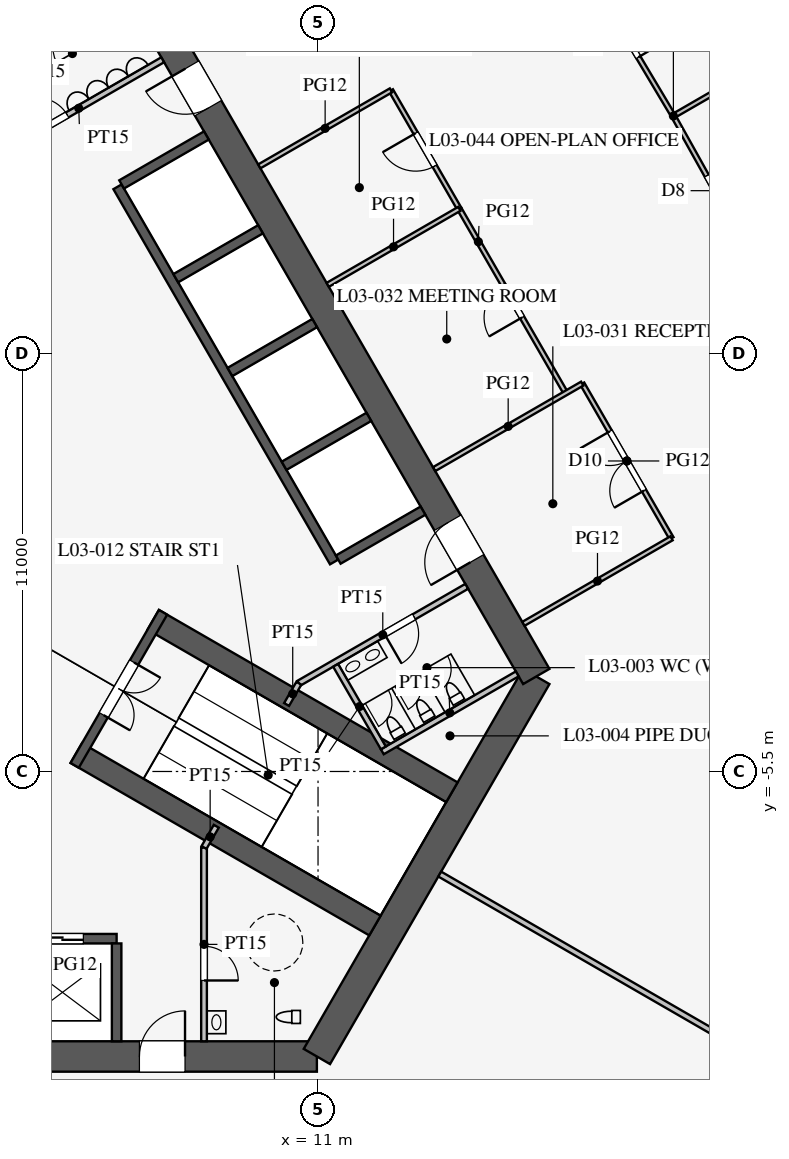
"""IFC4 building model, lengths in metres.
Left out: names, types, materials, properties, quantities, classifications, styles, units other than length and angle.
Written with IfcOpenShell. Run it as: python <this file> out.ifc"""

import sys

from ifc_helpers import new_model, si_unit, direction, frame, frame_2d, origin, place, context, subcontext, project, spatial, rectangle, extrude, element, fill, save


model = new_model("IFC4")
c1 = context("Model", 3, precision=1e-05, world=origin(), true_north=direction((0.0, 1.0)))
c2 = subcontext(c1, "Body", "Model", "MODEL_VIEW")
j1 = project(units=[si_unit("LENGTHUNIT", "METRE"), si_unit("PLANEANGLEUNIT", "RADIAN")], contexts=[c1])
p1 = place(None, origin())
s1 = spatial("IfcSite", under=j1, at=p1, CompositionType="ELEMENT")
p2 = place(p1, origin())
s2 = spatial("IfcBuilding", under=s1, at=p2, CompositionType="ELEMENT")
p3 = place(p2, frame((0.0, 0.0, 16.5)))
s3 = spatial("IfcBuildingStorey", under=s2, at=p3, CompositionType="ELEMENT", Elevation=16.5)
p4 = place(p3, frame((-10.97, -13.0, 0.0), z_axis=(0.0, 0.0, 1.0), x_axis=(1.0, 0.0, 0.0)))
e1 = element("IfcWall", 1, at=p4, inside=s3, PredefinedType="SHEAR", context=c2, shape_type="SweptSolid", body=[
    extrude(rectangle(XDim=21.939, YDim=0.8, at=frame_2d((10.97, 0.0))), origin(), (0.0, 0.0, 1.0), 4.2),
])
p5 = place(p4, frame((17.27, 0.0, 0.0)))
e2 = element("IfcOpeningElement", 2, at=p5, cuts=e1, PredefinedType="OPENING", context=c2, shape_type="SweptSolid", body=[
    extrude(rectangle(XDim=1.2, YDim=2.1, at=frame_2d((0.6, 1.05))), frame((0.0, 0.41, 0.0), z_axis=(0.0, -1.0, 0.0), x_axis=(1.0, 0.0, 0.0)), (0.0, 0.0, 1.0), 0.82),
])
p6 = place(p4, frame((3.47, 0.0, 0.0)))
e3 = element("IfcOpeningElement", 3, at=p6, cuts=e1, PredefinedType="OPENING", context=c2, shape_type="SweptSolid", body=[
    extrude(rectangle(XDim=1.2, YDim=2.1, at=frame_2d((0.6, 1.05))), frame((0.0, 0.41, 0.0), z_axis=(0.0, -1.0, 0.0), x_axis=(1.0, 0.0, 0.0)), (0.0, 0.0, 1.0), 0.82),
])
p7 = place(p3, frame((10.97, -13.0, 0.0), z_axis=(0.0, 0.0, 1.0), x_axis=(0.499995765644, 0.866027848477, 0.0)))
e4 = element("IfcWall", 4, at=p7, inside=s3, PredefinedType="SHEAR", context=c2, shape_type="SweptSolid", body=[
    extrude(rectangle(XDim=11.547, YDim=0.8, at=frame_2d((5.773, 0.0))), origin(), (0.0, 0.0, 1.0), 4.2),
])
p8 = place(p3, frame((16.743, -3.0, 0.0), z_axis=(0.0, 0.0, 1.0), x_axis=(-0.500002442456, 0.866023993627, 0.0)))
e5 = element("IfcWall", 5, at=p8, inside=s3, PredefinedType="SHEAR", context=c2, shape_type="SweptSolid", body=[
    extrude(rectangle(XDim=21.939, YDim=0.8, at=frame_2d((10.97, 0.0))), origin(), (0.0, 0.0, 1.0), 4.2),
])
p9 = place(p8, frame((17.27, 0.0, 0.0)))
e6 = element("IfcOpeningElement", 6, at=p9, cuts=e5, PredefinedType="OPENING", context=c2, shape_type="SweptSolid", body=[
    extrude(rectangle(XDim=1.2, YDim=2.1, at=frame_2d((0.6, 1.05))), frame((0.0, 0.41, 0.0), z_axis=(0.0, -1.0, 0.0), x_axis=(1.0, 0.0, 0.0)), (0.0, 0.0, 1.0), 0.82),
])
p10 = place(p8, frame((3.47, 0.0, 0.0)))
e7 = element("IfcOpeningElement", 7, at=p10, cuts=e5, PredefinedType="OPENING", context=c2, shape_type="SweptSolid", body=[
    extrude(rectangle(XDim=1.2, YDim=2.1, at=frame_2d((0.6, 1.05))), frame((0.0, 0.41, 0.0), z_axis=(0.0, -1.0, 0.0), x_axis=(1.0, 0.0, 0.0)), (0.0, 0.0, 1.0), 0.82),
])
p11 = place(p3, frame((-5.7, -9.9, 0.0), z_axis=(0.0, 0.0, 1.0), x_axis=(1.0, 0.0, 0.0)))
e8 = element("IfcWall", 8, at=p11, inside=s3, PredefinedType="SHEAR", context=c2, shape_type="SweptSolid", body=[
    extrude(rectangle(XDim=11.4, YDim=0.25, at=frame_2d((5.7, 0.0))), origin(), (0.0, 0.0, 1.0), 4.2),
])
p12 = place(p11, frame((0.875, 0.0, 0.0)))
e9 = element("IfcOpeningElement", 9, at=p12, cuts=e8, PredefinedType="OPENING", context=c2, shape_type="SweptSolid", body=[
    extrude(rectangle(XDim=1.1, YDim=2.2, at=frame_2d((0.55, 1.1))), frame((0.0, 0.135, 0.0), z_axis=(0.0, -1.0, 0.0), x_axis=(1.0, 0.0, 0.0)), (0.0, 0.0, 1.0), 0.27),
])
p13 = place(p11, frame((3.725, 0.0, 0.0)))
e10 = element("IfcOpeningElement", 10, at=p13, cuts=e8, PredefinedType="OPENING", context=c2, shape_type="SweptSolid", body=[
    extrude(rectangle(XDim=1.1, YDim=2.2, at=frame_2d((0.55, 1.1))), frame((0.0, 0.135, 0.0), z_axis=(0.0, -1.0, 0.0), x_axis=(1.0, 0.0, 0.0)), (0.0, 0.0, 1.0), 0.27),
])
p14 = place(p11, frame((6.575, 0.0, 0.0)))
e11 = element("IfcOpeningElement", 11, at=p14, cuts=e8, PredefinedType="OPENING", context=c2, shape_type="SweptSolid", body=[
    extrude(rectangle(XDim=1.1, YDim=2.2, at=frame_2d((0.55, 1.1))), frame((0.0, 0.135, 0.0), z_axis=(0.0, -1.0, 0.0), x_axis=(1.0, 0.0, 0.0)), (0.0, 0.0, 1.0), 0.27),
])
p15 = place(p11, frame((9.425, 0.0, 0.0)))
e12 = element("IfcOpeningElement", 12, at=p15, cuts=e8, PredefinedType="OPENING", context=c2, shape_type="SweptSolid", body=[
    extrude(rectangle(XDim=1.1, YDim=2.2, at=frame_2d((0.55, 1.1))), frame((0.0, 0.135, 0.0), z_axis=(0.0, -1.0, 0.0), x_axis=(1.0, 0.0, 0.0)), (0.0, 0.0, 1.0), 0.27),
])
p16 = place(p3, frame((5.7, -10.025, 0.0), z_axis=(0.0, 0.0, 1.0), x_axis=(0.0, -1.0, 0.0)))
e13 = element("IfcWall", 13, at=p16, inside=s3, PredefinedType="SHEAR", context=c2, shape_type="SweptSolid", body=[
    extrude(rectangle(XDim=2.575, YDim=0.25, at=frame_2d((1.288, 0.0))), origin(), (0.0, 0.0, 1.0), 4.2),
])
p17 = place(p3, frame((11.424, 0.014, 0.0), z_axis=(0.0, 0.0, 1.0), x_axis=(-0.500001763848, 0.866024385424, 0.0)))
e14 = element("IfcWall", 14, at=p17, inside=s3, PredefinedType="SHEAR", context=c2, shape_type="SweptSolid", body=[
    extrude(rectangle(XDim=11.4, YDim=0.25, at=frame_2d((5.7, 0.0))), origin(), (0.0, 0.0, 1.0), 4.2),
])
for number, where, z_axis, x_axis in (
    (15, (11.532, 0.076, 0.0), (0.0, 0.0, 1.0), (0.866, 0.5, 0.0)),
    (16, (10.107, 2.544, 0.0), (0.0, 0.0, 1.0), (0.866, 0.5, 0.0)),
    (17, (8.682, 5.012, 0.0), (0.0, 0.0, 1.0), (0.866, 0.5, 0.0)),
    (18, (7.257, 7.481, 0.0), (0.0, 0.0, 1.0), (0.866, 0.5, 0.0)),
):
    element("IfcWall", number, at=place(p3, frame(where, z_axis=z_axis, x_axis=x_axis)), inside=s3, PredefinedType="SHEAR", context=c2, shape_type="SweptSolid", body=[
        extrude(rectangle(XDim=2.575, YDim=0.25, at=frame_2d((1.288, 0.0))), origin(), (0.0, 0.0, 1.0), 4.2),
    ])
p18 = place(p3, frame((5.832, 9.949, 0.0), z_axis=(0.0, 0.0, 1.0), x_axis=(0.866029291668, 0.499993265928, 0.0)))
e19 = element("IfcWall", 19, at=p18, inside=s3, PredefinedType="SHEAR", context=c2, shape_type="SweptSolid", body=[
    extrude(rectangle(XDim=2.575, YDim=0.25, at=frame_2d((1.288, 0.0))), origin(), (0.0, 0.0, 1.0), 4.2),
])
for number, where, z_axis, x_axis in (
    (20, (4.638, -5.016, 0.0), (0.0, 0.0, 1.0), (0.866, -0.5, 0.0)),
    (21, (6.663, -1.509, 0.0), (0.0, 0.0, 1.0), (0.866, -0.5, 0.0)),
):
    element("IfcWall", number, at=place(p3, frame(where, z_axis=z_axis, x_axis=x_axis)), inside=s3, PredefinedType="SHEAR", context=c2, shape_type="SweptSolid", body=[
        extrude(rectangle(XDim=9.075, YDim=0.6, at=frame_2d((4.538, 0.0))), origin(), (0.0, 0.0, 1.0), 4.2),
    ])
p19 = place(p3, frame((4.597, -5.339, 0.0), z_axis=(0.0, 0.0, 1.0), x_axis=(0.499984536904, 0.866034331223, 0.0)))
e22 = element("IfcWall", 22, at=p19, inside=s3, PredefinedType="SHEAR", context=c2, shape_type="SweptSolid", body=[
    extrude(rectangle(XDim=4.65, YDim=0.25, at=frame_2d((2.325, 0.0))), origin(), (0.0, 0.0, 1.0), 4.2),
])
p20 = place(p19, frame((1.525, 0.0, 0.0)))
e23 = element("IfcOpeningElement", 23, at=p20, cuts=e22, PredefinedType="OPENING", context=c2, shape_type="SweptSolid", body=[
    extrude(rectangle(XDim=1.6, YDim=2.1, at=frame_2d((0.8, 1.05))), frame((0.0, 0.135, 0.0), z_axis=(0.0, -1.0, 0.0), x_axis=(1.0, 0.0, 0.0)), (0.0, 0.0, 1.0), 0.27),
])
p21 = place(p3, frame((8.0, -7.5, 0.0), z_axis=(0.0, 0.0, 1.0), x_axis=(0.0, -1.0, 0.0)))
e24 = element("IfcWall", 24, at=p21, inside=s3, PredefinedType="PARTITIONING", context=c2, shape_type="SweptSolid", body=[
    extrude(rectangle(XDim=5.1, YDim=0.15, at=frame_2d((2.55, 0.0))), origin(), (0.0, 0.0, 1.0), 4.0),
])
p22 = place(p21, frame((2.6, 0.0, 0.0)))
e25 = element("IfcOpeningElement", 25, at=p22, cuts=e24, PredefinedType="OPENING", context=c2, shape_type="SweptSolid", body=[
    extrude(rectangle(XDim=0.9, YDim=2.1, at=frame_2d((0.45, 1.05))), frame((0.0, 0.085, 0.0), z_axis=(0.0, -1.0, 0.0), x_axis=(1.0, 0.0, 0.0)), (0.0, 0.0, 1.0), 0.17),
])
p23 = place(p3, frame((2.495, 10.678, 0.0), z_axis=(0.0, 0.0, 1.0), x_axis=(0.86602216432, 0.500005610874, 0.0)))
e26 = element("IfcWall", 26, at=p23, inside=s3, PredefinedType="PARTITIONING", context=c2, shape_type="SweptSolid", body=[
    extrude(rectangle(XDim=5.1, YDim=0.15, at=frame_2d((2.55, 0.0))), origin(), (0.0, 0.0, 1.0), 4.0),
])
p24 = place(p23, frame((1.3, 0.0, 0.0)))
e27 = element("IfcOpeningElement", 27, at=p24, cuts=e26, PredefinedType="OPENING", context=c2, shape_type="SweptSolid", body=[
    extrude(rectangle(XDim=0.9, YDim=2.1, at=frame_2d((0.45, 1.05))), frame((0.0, 0.085, 0.0), z_axis=(0.0, -1.0, 0.0), x_axis=(1.0, 0.0, 0.0)), (0.0, 0.0, 1.0), 0.17),
])
p25 = place(p3, frame((10.495, -3.178, 0.0), z_axis=(0.0, 0.0, 1.0), x_axis=(0.86602216432, 0.500005610874, 0.0)))
e28 = element("IfcWall", 28, at=p25, inside=s3, PredefinedType="PARTITIONING", context=c2, shape_type="SweptSolid", body=[
    extrude(rectangle(XDim=5.1, YDim=0.15, at=frame_2d((2.55, 0.0))), origin(), (0.0, 0.0, 1.0), 4.0),
])
p26 = place(p25, frame((2.6, 0.0, 0.0)))
e29 = element("IfcOpeningElement", 29, at=p26, cuts=e28, PredefinedType="OPENING", context=c2, shape_type="SweptSolid", body=[
    extrude(rectangle(XDim=0.9, YDim=2.1, at=frame_2d((0.45, 1.05))), frame((0.0, 0.085, 0.0), z_axis=(0.0, -1.0, 0.0), x_axis=(1.0, 0.0, 0.0)), (0.0, 0.0, 1.0), 0.17),
])
for number, where, z_axis, x_axis in (
    (30, (8.0, -7.5, 0.0), (0.0, 0.0, 1.0), (0.5, 0.866, 0.0)),
    (31, (10.495, -3.178, 0.0), (0.0, 0.0, 1.0), (-0.5, -0.866, 0.0)),
):
    element("IfcWall", number, at=place(p3, frame(where, z_axis=z_axis, x_axis=x_axis)), inside=s3, PredefinedType="PARTITIONING", context=c2, shape_type="SweptSolid", body=[
        extrude(rectangle(XDim=0.645, YDim=0.15, at=frame_2d((0.323, 0.0))), origin(), (0.0, 0.0, 1.0), 4.0),
    ])
p27 = place(p3, frame((12.691, -4.982, 0.0), z_axis=(0.0, 0.0, 1.0), x_axis=(0.8660249478, 0.500000789788, 0.0)))
e32 = element("IfcWall", 32, at=p27, inside=s3, PredefinedType="PARTITIONING", context=c2, shape_type="SweptSolid", body=[
    extrude(rectangle(XDim=4.1, YDim=0.15, at=frame_2d((2.05, 0.0))), origin(), (0.0, 0.0, 1.0), 4.0),
])
p28 = place(p3, frame((11.464, -2.706, 0.0), z_axis=(0.0, 0.0, 1.0), x_axis=(0.50001992892, -0.866013897511, 0.0)))
e33 = element("IfcWall", 33, at=p28, inside=s3, PredefinedType="PARTITIONING", context=c2, shape_type="SweptSolid", body=[
    extrude(rectangle(XDim=2.51, YDim=0.15, at=frame_2d((1.255, 0.0))), origin(), (0.0, 0.0, 1.0), 4.0),
])
p29 = place(p3, frame((2.031, 13.482, 0.0), z_axis=(0.0, 0.0, 1.0), x_axis=(0.866050731258, 0.499956128963, 0.0)))
e34 = element("IfcWall", 34, at=p29, inside=s3, PredefinedType="PARTITIONING", context=c2, shape_type="SweptSolid", body=[
    extrude(rectangle(XDim=4.1, YDim=0.15, at=frame_2d((2.05, 0.0))), origin(), (0.0, 0.0, 1.0), 4.0),
])
p30 = place(p3, frame((14.203, -8.2, 0.0), z_axis=(0.0, 0.0, 1.0), x_axis=(0.866024965723, -0.500000758745, 0.0)))
e35 = element("IfcWall", 35, at=p30, inside=s3, PredefinedType="PARTITIONING", context=c2, shape_type="SweptSolid", body=[
    extrude(rectangle(XDim=18.25, YDim=0.15, at=frame_2d((9.125, 0.0))), origin(), (0.0, 0.0, 1.0), 2.3),
])
p31 = place(p3, frame((14.719, 9.306, 0.0), z_axis=(0.0, 0.0, 1.0), x_axis=(-0.499961193289, 0.866047807691, 0.0)))
e36 = element("IfcWall", 36, at=p31, inside=s3, PredefinedType="PARTITIONING", context=c2, shape_type="SweptSolid", body=[
    extrude(rectangle(XDim=3.6, YDim=0.12, at=frame_2d((1.8, 0.0))), origin(), (0.0, 0.0, 1.0), 2.9),
])
p32 = place(p31, frame((1.3, 0.0, 0.15)))
e37 = element("IfcOpeningElement", 37, at=p32, cuts=e36, PredefinedType="OPENING", context=c2, shape_type="SweptSolid", body=[
    extrude(rectangle(XDim=1.0, YDim=2.1, at=frame_2d((0.5, 1.05))), frame((0.0, 0.07, 0.0), z_axis=(0.0, -1.0, 0.0), x_axis=(1.0, 0.0, 0.0)), (0.0, 0.0, 1.0), 0.14),
])
p33 = place(p3, frame((17.519, 4.457, 0.0), z_axis=(0.0, 0.0, 1.0), x_axis=(-0.500016814911, 0.866015695474, 0.0)))
e38 = element("IfcWall", 38, at=p33, inside=s3, PredefinedType="PARTITIONING", context=c2, shape_type="SweptSolid", body=[
    extrude(rectangle(XDim=5.6, YDim=0.12, at=frame_2d((2.8, 0.0))), origin(), (0.0, 0.0, 1.0), 2.9),
])
p34 = place(p33, frame((2.3, 0.0, 0.15)))
e39 = element("IfcOpeningElement", 39, at=p34, cuts=e38, PredefinedType="OPENING", context=c2, shape_type="SweptSolid", body=[
    extrude(rectangle(XDim=1.0, YDim=2.1, at=frame_2d((0.5, 1.05))), frame((0.0, 0.07, 0.0), z_axis=(0.0, -1.0, 0.0), x_axis=(1.0, 0.0, 0.0)), (0.0, 0.0, 1.0), 0.14),
])
p35 = place(p3, frame((20.302, 0.636, 0.0), z_axis=(0.0, 0.0, 1.0), x_axis=(-0.499977259774, 0.866038532462, 0.0)))
e40 = element("IfcWall", 40, at=p35, inside=s3, PredefinedType="PARTITIONING", context=c2, shape_type="SweptSolid", body=[
    extrude(rectangle(XDim=4.7, YDim=0.12, at=frame_2d((2.35, 0.0))), origin(), (0.0, 0.0, 1.0), 2.9),
])
p36 = place(p35, frame((1.45, 0.0, 0.15)))
e41 = element("IfcOpeningElement", 41, at=p36, cuts=e40, PredefinedType="OPENING", context=c2, shape_type="SweptSolid", body=[
    extrude(rectangle(XDim=1.8, YDim=2.1, at=frame_2d((0.9, 1.05))), frame((0.0, 0.07, 0.0), z_axis=(0.0, -1.0, 0.0), x_axis=(1.0, 0.0, 0.0)), (0.0, 0.0, 1.0), 0.14),
])
for number, where, z_axis, x_axis in (
    (42, (11.255, 7.306, 0.0), (0.0, 0.0, 1.0), (0.866, 0.5, 0.0)),
    (43, (9.455, 10.424, 0.0), (0.0, 0.0, 1.0), (0.866, 0.5, 0.0)),
):
    element("IfcWall", number, at=place(p3, frame(where, z_axis=z_axis, x_axis=x_axis)), inside=s3, PredefinedType="PARTITIONING", context=c2, shape_type="SweptSolid", body=[
        extrude(rectangle(XDim=4.0, YDim=0.12, at=frame_2d((2.0, 0.0))), origin(), (0.0, 0.0, 1.0), 2.9),
    ])
p37 = place(p3, frame((14.055, 2.457, 0.0), z_axis=(0.0, 0.0, 1.0), x_axis=(0.866031096941, 0.499990139034, 0.0)))
e44 = element("IfcWall", 44, at=p37, inside=s3, PredefinedType="PARTITIONING", context=c2, shape_type="SweptSolid", body=[
    extrude(rectangle(XDim=4.5, YDim=0.12, at=frame_2d((2.25, 0.0))), origin(), (0.0, 0.0, 1.0), 2.9),
])
p38 = place(p3, frame((16.405, -1.614, 0.0), z_axis=(0.0, 0.0, 1.0), x_axis=(0.866017533419, 0.500013631625, 0.0)))
e45 = element("IfcWall", 45, at=p38, inside=s3, PredefinedType="PARTITIONING", context=c2, shape_type="SweptSolid", body=[
    extrude(rectangle(XDim=4.5, YDim=0.12, at=frame_2d((2.25, 0.0))), origin(), (0.0, 0.0, 1.0), 2.9),
])
p39 = place(p3, frame((20.351, 11.749, 0.0), z_axis=(0.0, 0.0, 1.0), x_axis=(-0.51252396108, 0.858672923364, 0.0)))
e46 = element("IfcWall", 46, at=p39, inside=s3, PredefinedType="PARTITIONING", context=c2, shape_type="SweptSolid", body=[
    extrude(rectangle(XDim=4.5, YDim=0.12, at=frame_2d((2.25, 0.0))), origin(), (0.0, 0.0, 1.0), 2.9),
])
p40 = place(p39, frame((1.8, 0.0, 0.15)))
e47 = element("IfcOpeningElement", 47, at=p40, cuts=e46, PredefinedType="OPENING", context=c2, shape_type="SweptSolid", body=[
    extrude(rectangle(XDim=0.9, YDim=2.1, at=frame_2d((0.45, 1.05))), frame((0.0, 0.07, 0.0), z_axis=(0.0, -1.0, 0.0), x_axis=(1.0, 0.0, 0.0)), (0.0, 0.0, 1.0), 0.14),
])
p41 = place(p3, frame((22.544, 7.82, 0.0), z_axis=(0.0, 0.0, 1.0), x_axis=(-0.487373854787, 0.873193406795, 0.0)))
e48 = element("IfcWall", 48, at=p41, inside=s3, PredefinedType="PARTITIONING", context=c2, shape_type="SweptSolid", body=[
    extrude(rectangle(XDim=4.5, YDim=0.12, at=frame_2d((2.25, 0.0))), origin(), (0.0, 0.0, 1.0), 2.9),
])
p42 = place(p41, frame((1.8, 0.0, 0.15)))
e49 = element("IfcOpeningElement", 49, at=p42, cuts=e48, PredefinedType="OPENING", context=c2, shape_type="SweptSolid", body=[
    extrude(rectangle(XDim=0.9, YDim=2.1, at=frame_2d((0.45, 1.05))), frame((0.0, 0.07, 0.0), z_axis=(0.0, -1.0, 0.0), x_axis=(1.0, 0.0, 0.0)), (0.0, 0.0, 1.0), 0.14),
])
p43 = place(p3, frame((20.351, 11.749, 0.0), z_axis=(0.0, 0.0, 1.0), x_axis=(0.865989150234, 0.500062787734, 0.0)))
e50 = element("IfcWall", 50, at=p43, inside=s3, PredefinedType="PARTITIONING", context=c2, shape_type="SweptSolid", body=[
    extrude(rectangle(XDim=2.67, YDim=0.12, at=frame_2d((1.335, 0.0))), origin(), (0.0, 0.0, 1.0), 2.9),
])
p44 = place(p22, origin())
e51 = element("IfcDoor", 51, at=p44, inside=s3, OperationType="SINGLE_SWING_RIGHT", PredefinedType="DOOR", context=c2, shape_type="SweptSolid", body=[
    extrude(rectangle(XDim=0.9, YDim=2.1, at=frame_2d((0.45, 1.05))), frame((0.0, 0.025, 0.0), z_axis=(0.0, -1.0, 0.0), x_axis=(1.0, 0.0, 0.0)), (0.0, 0.0, 1.0), 0.05),
])
fill(e25, e51)
p45 = place(p24, origin())
e52 = element("IfcDoor", 52, at=p45, inside=s3, OperationType="SINGLE_SWING_LEFT", PredefinedType="DOOR", context=c2, shape_type="SweptSolid", body=[
    extrude(rectangle(XDim=0.9, YDim=2.1, at=frame_2d((0.45, 1.05))), frame((0.0, 0.025, 0.0), z_axis=(0.0, -1.0, 0.0), x_axis=(1.0, 0.0, 0.0)), (0.0, 0.0, 1.0), 0.05),
])
fill(e27, e52)
p46 = place(p26, frame((0.9, 0.0, 0.0), z_axis=(0.0, 0.0, 1.0), x_axis=(-1.0, 0.0, 0.0)))
e53 = element("IfcDoor", 53, at=p46, inside=s3, OperationType="SINGLE_SWING_RIGHT", PredefinedType="DOOR", context=c2, shape_type="SweptSolid", body=[
    extrude(rectangle(XDim=0.9, YDim=2.1, at=frame_2d((0.45, 1.05))), frame((0.0, 0.025, 0.0), z_axis=(0.0, -1.0, 0.0), x_axis=(1.0, 0.0, 0.0)), (0.0, 0.0, 1.0), 0.05),
])
fill(e29, e53)
p47 = place(p20, frame((1.6, 0.0, 0.0), z_axis=(0.0, 0.0, 1.0), x_axis=(-1.0, 0.0, 0.0)))
e54 = element("IfcDoor", 54, at=p47, inside=s3, OperationType="DOUBLE_DOOR_SINGLE_SWING", PredefinedType="DOOR", context=c2, shape_type="SweptSolid", body=[
    extrude(rectangle(XDim=1.6, YDim=2.1, at=frame_2d((0.8, 1.05))), frame((0.0, 0.025, 0.0), z_axis=(0.0, -1.0, 0.0), x_axis=(1.0, 0.0, 0.0)), (0.0, 0.0, 1.0), 0.05),
])
fill(e23, e54)
p48 = place(p5, origin())
e55 = element("IfcDoor", 55, at=p48, inside=s3, OperationType="SINGLE_SWING_RIGHT", PredefinedType="DOOR", context=c2, shape_type="SweptSolid", body=[
    extrude(rectangle(XDim=1.2, YDim=2.1, at=frame_2d((0.6, 1.05))), frame((0.0, 0.025, 0.0), z_axis=(0.0, -1.0, 0.0), x_axis=(1.0, 0.0, 0.0)), (0.0, 0.0, 1.0), 0.05),
])
fill(e2, e55)
p49 = place(p9, origin())
e56 = element("IfcDoor", 56, at=p49, inside=s3, OperationType="SINGLE_SWING_RIGHT", PredefinedType="DOOR", context=c2, shape_type="SweptSolid", body=[
    extrude(rectangle(XDim=1.2, YDim=2.1, at=frame_2d((0.6, 1.05))), frame((0.0, 0.025, 0.0), z_axis=(0.0, -1.0, 0.0), x_axis=(1.0, 0.0, 0.0)), (0.0, 0.0, 1.0), 0.05),
])
fill(e6, e56)
p50 = place(p10, origin())
e57 = element("IfcDoor", 57, at=p50, inside=s3, OperationType="SINGLE_SWING_LEFT", PredefinedType="DOOR", context=c2, shape_type="SweptSolid", body=[
    extrude(rectangle(XDim=1.2, YDim=2.1, at=frame_2d((0.6, 1.05))), frame((0.0, 0.025, 0.0), z_axis=(0.0, -1.0, 0.0), x_axis=(1.0, 0.0, 0.0)), (0.0, 0.0, 1.0), 0.05),
])
fill(e7, e57)
p51 = place(p36, origin())
e58 = element("IfcDoor", 58, at=p51, inside=s3, OperationType="DOUBLE_DOOR_SINGLE_SWING", PredefinedType="DOOR", context=c2, shape_type="SweptSolid", body=[
    extrude(rectangle(XDim=1.8, YDim=2.1, at=frame_2d((0.9, 1.05))), frame((0.0, 0.025, 0.0), z_axis=(0.0, -1.0, 0.0), x_axis=(1.0, 0.0, 0.0)), (0.0, 0.0, 1.0), 0.05),
])
fill(e41, e58)
p52 = place(p34, origin())
e59 = element("IfcDoor", 59, at=p52, inside=s3, OperationType="SINGLE_SWING_LEFT", PredefinedType="DOOR", context=c2, shape_type="SweptSolid", body=[
    extrude(rectangle(XDim=1.0, YDim=2.1, at=frame_2d((0.5, 1.05))), frame((0.0, 0.025, 0.0), z_axis=(0.0, -1.0, 0.0), x_axis=(1.0, 0.0, 0.0)), (0.0, 0.0, 1.0), 0.05),
])
fill(e39, e59)
p53 = place(p32, origin())
e60 = element("IfcDoor", 60, at=p53, inside=s3, OperationType="SINGLE_SWING_RIGHT", PredefinedType="DOOR", context=c2, shape_type="SweptSolid", body=[
    extrude(rectangle(XDim=1.0, YDim=2.1, at=frame_2d((0.5, 1.05))), frame((0.0, 0.025, 0.0), z_axis=(0.0, -1.0, 0.0), x_axis=(1.0, 0.0, 0.0)), (0.0, 0.0, 1.0), 0.05),
])
fill(e37, e60)
p54 = place(p40, frame((0.9, 0.0, 0.0), z_axis=(0.0, 0.0, 1.0), x_axis=(-1.0, 0.0, 0.0)))
e61 = element("IfcDoor", 61, at=p54, inside=s3, OperationType="SINGLE_SWING_RIGHT", PredefinedType="DOOR", context=c2, shape_type="SweptSolid", body=[
    extrude(rectangle(XDim=0.9, YDim=2.1, at=frame_2d((0.45, 1.05))), frame((0.0, 0.025, 0.0), z_axis=(0.0, -1.0, 0.0), x_axis=(1.0, 0.0, 0.0)), (0.0, 0.0, 1.0), 0.05),
])
fill(e47, e61)
p55 = place(p42, frame((0.9, 0.0, 0.0), z_axis=(0.0, 0.0, 1.0), x_axis=(-1.0, 0.0, 0.0)))
e62 = element("IfcDoor", 62, at=p55, inside=s3, OperationType="SINGLE_SWING_RIGHT", PredefinedType="DOOR", context=c2, shape_type="SweptSolid", body=[
    extrude(rectangle(XDim=0.9, YDim=2.1, at=frame_2d((0.45, 1.05))), frame((0.0, 0.025, 0.0), z_axis=(0.0, -1.0, 0.0), x_axis=(1.0, 0.0, 0.0)), (0.0, 0.0, 1.0), 0.05),
])
fill(e49, e62)
p56 = place(p15, origin())
e63 = element("IfcDoor", 63, at=p56, inside=s3, OperationType="DOUBLE_DOOR_SLIDING", PredefinedType="DOOR", context=c2, shape_type="SweptSolid", body=[
    extrude(rectangle(XDim=1.1, YDim=2.2, at=frame_2d((0.55, 1.1))), frame((0.0, 0.025, 0.0), z_axis=(0.0, -1.0, 0.0), x_axis=(1.0, 0.0, 0.0)), (0.0, 0.0, 1.0), 0.05),
])
fill(e12, e63)
save(model, sys.argv[1])
